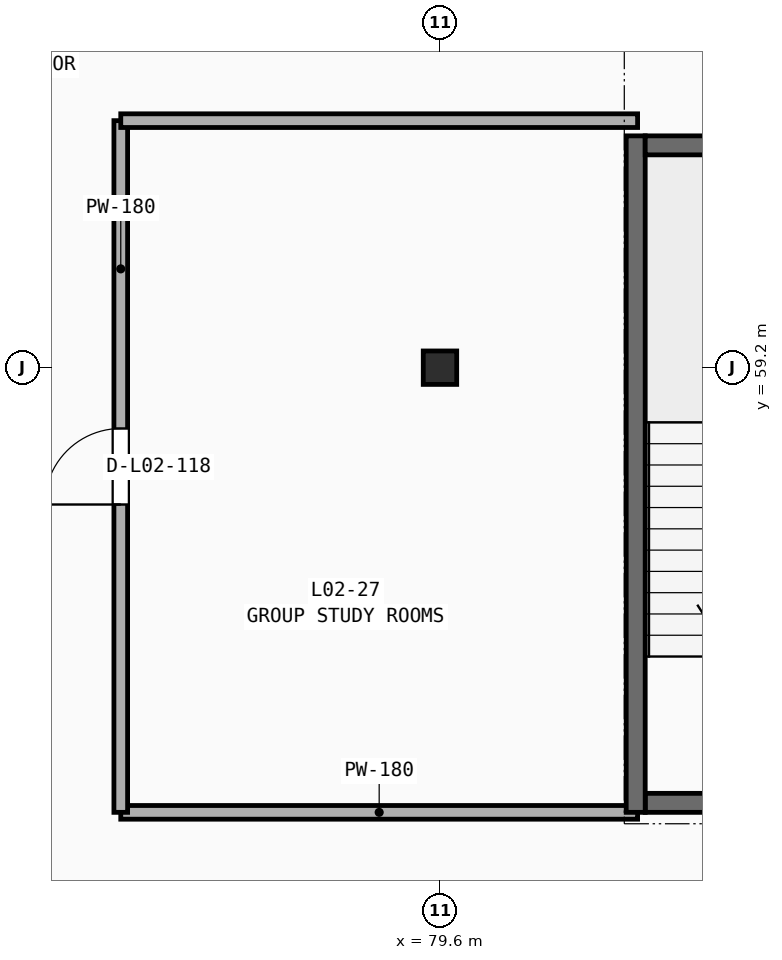
"""IFC4 building model, lengths in metres.
Left out: names, types, materials, properties, quantities, classifications, styles, units other than length and angle.
Written with IfcOpenShell. Run it as: python <this file> out.ifc"""

import sys

from ifc_helpers import new_model, si_unit, direction, frame, frame_2d, origin, origin_2d, place, context, subcontext, project, spatial, rectangle, extrude, element, fill, save


model = new_model("IFC4")
c1 = context("Model", 3, precision=1e-05, world=origin(), true_north=direction((0.0, 1.0)))
c2 = subcontext(c1, "Body", "Model", "MODEL_VIEW")
j1 = project(units=[si_unit("LENGTHUNIT", "METRE"), si_unit("PLANEANGLEUNIT", "RADIAN")], contexts=[c1])
p1 = place(None, origin())
s1 = spatial("IfcSite", under=j1, at=p1, CompositionType="ELEMENT")
p2 = place(p1, origin())
s2 = spatial("IfcBuilding", under=s1, at=p2, CompositionType="ELEMENT")
p3 = place(p2, frame((0.0, 0.0, 9.6)))
s3 = spatial("IfcBuildingStorey", under=s2, at=p3, CompositionType="ELEMENT", Elevation=9.6)
p4 = place(p3, frame((79.6, 59.2, 0.0), z_axis=(0.0, 0.0, 1.0), x_axis=(1.0, 0.0, 0.0)))
e1 = element("IfcColumn", 1, at=p4, inside=s3, PredefinedType="COLUMN", context=c2, shape_type="SweptSolid", body=[
    extrude(rectangle(XDim=0.44, YDim=0.44, at=origin_2d()), origin(), (0.0, 0.0, 1.0), 4.2),
])
p5 = place(p3, frame((75.4, 53.35, 0.0), z_axis=(0.0, 0.0, 1.0), x_axis=(1.0, 0.0, 0.0)))
e2 = element("IfcWall", 2, at=p5, inside=s3, PredefinedType="PARTITIONING", context=c2, shape_type="SweptSolid", body=[
    extrude(rectangle(XDim=6.8, YDim=0.18, at=frame_2d((3.4, 0.0))), origin(), (0.0, 0.0, 1.0), 3.47),
])
p6 = place(p3, frame((75.4, 53.35, 0.0), z_axis=(0.0, 0.0, 1.0), x_axis=(0.0, 1.0, 0.0)))
e3 = element("IfcWall", 3, at=p6, inside=s3, PredefinedType="PARTITIONING", context=c2, shape_type="SweptSolid", body=[
    extrude(rectangle(XDim=9.1, YDim=0.18, at=frame_2d((4.55, 0.0))), origin(), (0.0, 0.0, 1.0), 3.27),
])
p7 = place(p6, frame((4.05, 0.0, -0.01)))
e4 = element("IfcOpeningElement", 4, at=p7, cuts=e3, PredefinedType="OPENING", context=c2, shape_type="SweptSolid", body=[
    extrude(rectangle(XDim=1.0, YDim=2.16, at=frame_2d((0.5, 1.08))), frame((0.0, 0.1, 0.0), z_axis=(0.0, -1.0, 0.0), x_axis=(1.0, 0.0, 0.0)), (0.0, 0.0, 1.0), 0.2),
])
p8 = place(p3, frame((75.4, 62.45, 0.0), z_axis=(0.0, 0.0, 1.0), x_axis=(1.0, 0.0, 0.0)))
e5 = element("IfcWall", 5, at=p8, inside=s3, PredefinedType="PARTITIONING", context=c2, shape_type="SweptSolid", body=[
    extrude(rectangle(XDim=6.8, YDim=0.18, at=frame_2d((3.4, 0.0))), origin(), (0.0, 0.0, 1.0), 3.47),
])
p9 = place(p3, frame((82.3, 53.475, 0.0), z_axis=(0.0, 0.0, 1.0), x_axis=(1.0, 0.0, 0.0)))
e6 = element("IfcWall", 6, at=p9, inside=s3, PredefinedType="SHEAR", context=c2, shape_type="SweptSolid", body=[
    extrude(rectangle(XDim=3.5, YDim=0.25, at=frame_2d((1.75, 0.0))), origin(), (0.0, 0.0, 1.0), 4.2),
])
p10 = place(p9, frame((1.1, 0.0, -0.01)))
e7 = element("IfcOpeningElement", 7, at=p10, cuts=e6, PredefinedType="OPENING", context=c2, shape_type="SweptSolid", body=[
    extrude(rectangle(XDim=1.3, YDim=2.16, at=frame_2d((0.65, 1.08))), frame((0.0, 0.135, 0.0), z_axis=(0.0, -1.0, 0.0), x_axis=(1.0, 0.0, 0.0)), (0.0, 0.0, 1.0), 0.27),
])
p11 = place(p3, frame((82.175, 53.35, 0.0), z_axis=(0.0, 0.0, 1.0), x_axis=(0.0, 1.0, 0.0)))
e8 = element("IfcWall", 8, at=p11, inside=s3, PredefinedType="SHEAR", context=c2, shape_type="SweptSolid", body=[
    extrude(rectangle(XDim=8.9, YDim=0.25, at=frame_2d((4.45, 0.0))), origin(), (0.0, 0.0, 1.0), 4.2),
])
p12 = place(p3, frame((85.8, 62.125, 0.0), z_axis=(0.0, 0.0, 1.0), x_axis=(-1.0, 0.0, 0.0)))
e9 = element("IfcWall", 9, at=p12, inside=s3, PredefinedType="SHEAR", context=c2, shape_type="SweptSolid", body=[
    extrude(rectangle(XDim=3.5, YDim=0.25, at=frame_2d((1.75, 0.0))), origin(), (0.0, 0.0, 1.0), 4.2),
])
p13 = place(p7, frame((0.0, 0.0, 0.01)))
e10 = element("IfcDoor", 10, at=p13, inside=s3, OperationType="SINGLE_SWING_LEFT", PredefinedType="DOOR", context=c2, shape_type="SweptSolid", body=[
    extrude(rectangle(XDim=1.0, YDim=2.15, at=frame_2d((0.5, 1.075))), frame((0.0, 0.025, 0.0), z_axis=(0.0, -1.0, 0.0), x_axis=(1.0, 0.0, 0.0)), (0.0, 0.0, 1.0), 0.05),
])
fill(e4, e10)
save(model, sys.argv[1])
